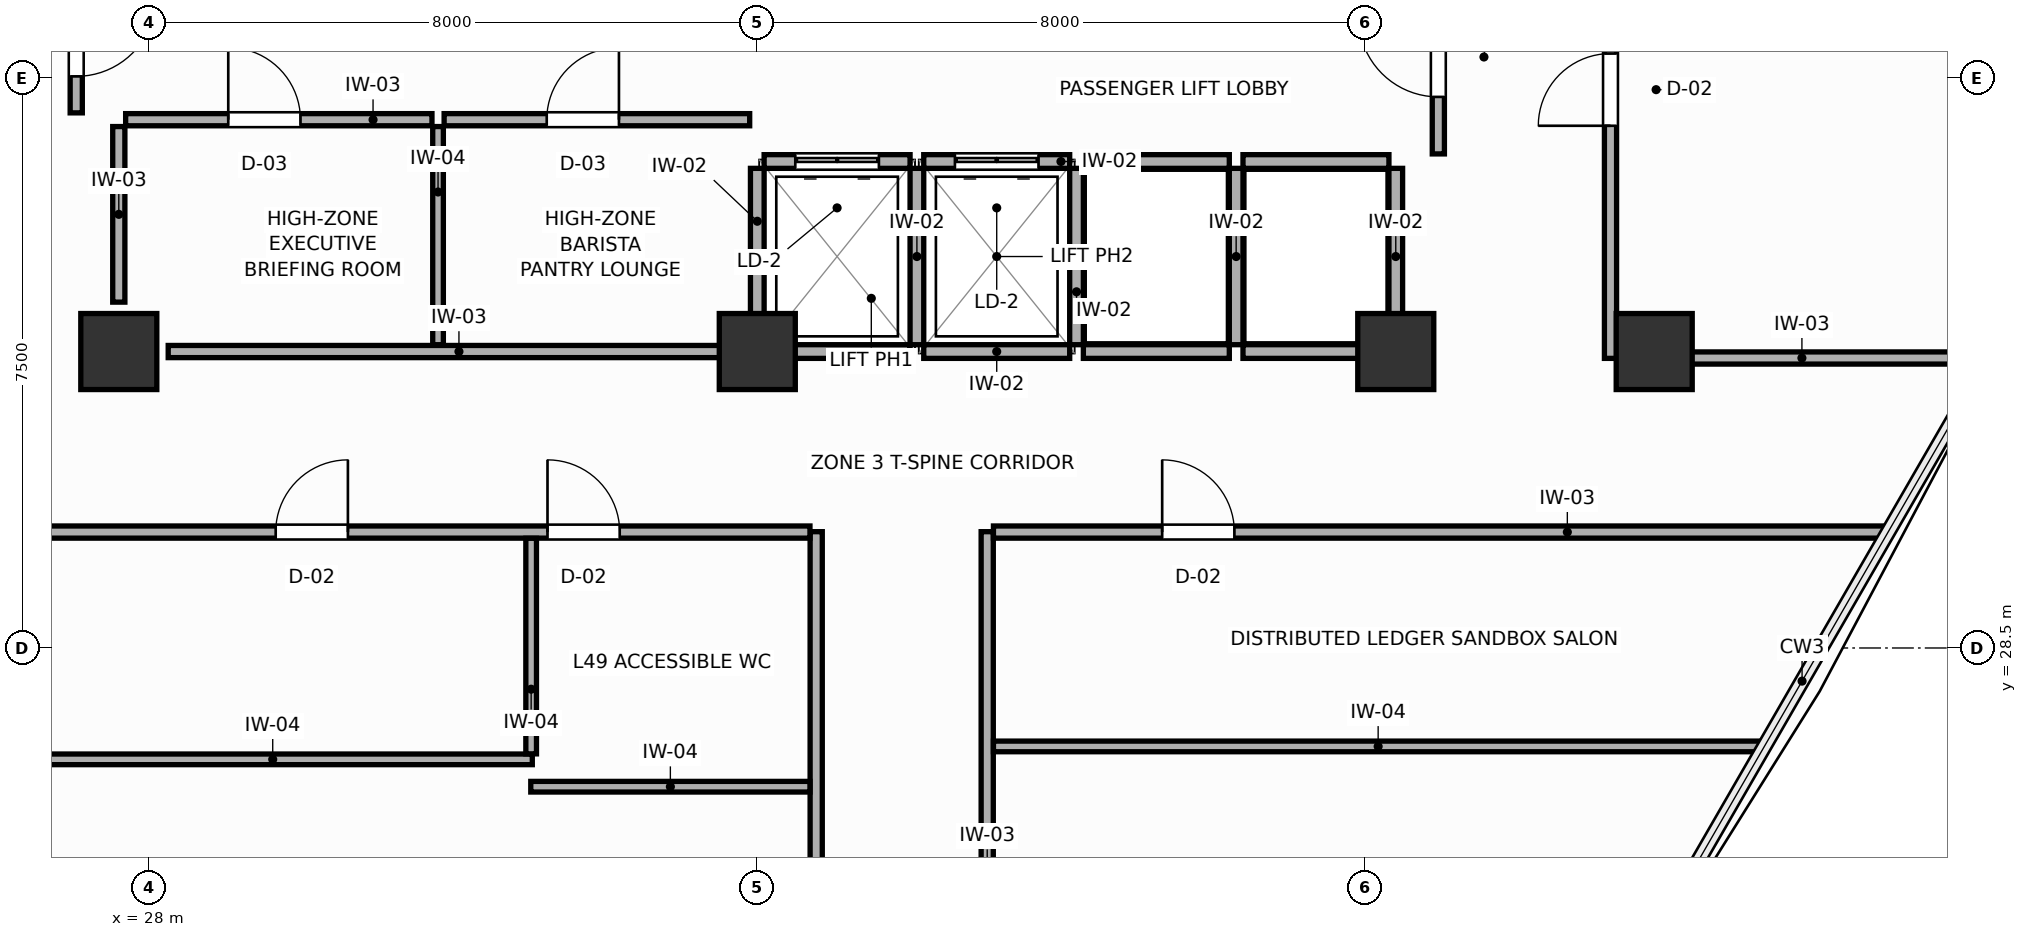
"""IFC4 building model, lengths in metres.
Left out: names, types, materials, properties, quantities, classifications, styles, units other than length and angle.
Written with IfcOpenShell. Run it as: python <this file> out.ifc"""

import sys

from ifc_helpers import new_model, si_unit, direction, frame, frame_2d, origin, origin_2d, place, context, subcontext, project, spatial, rectangle, extrude, source, transform, mapped, element, fill, save


model = new_model("IFC4")
c1 = context("Model", 3, precision=1e-05, world=origin(), true_north=direction((0.0, 1.0)))
c2 = subcontext(c1, "Body", "Model", "MODEL_VIEW")
j1 = project(units=[si_unit("LENGTHUNIT", "METRE"), si_unit("PLANEANGLEUNIT", "RADIAN")], contexts=[c1])
p1 = place(None, origin())
s1 = spatial("IfcSite", under=j1, at=p1, CompositionType="ELEMENT")
p2 = place(p1, origin())
s2 = spatial("IfcBuilding", under=s1, at=p2, CompositionType="ELEMENT")
p3 = place(p2, frame((0.0, 0.0, 190.2)))
s3 = spatial("IfcBuildingStorey", under=s2, at=p3, CompositionType="ELEMENT", Elevation=190.2)
m1 = source(origin(), c2, "Body", "SweptSolid", [
    extrude(rectangle(XDim=1.0, YDim=1.0, at=origin_2d()), origin(), (0.0, 0.0, 1.0), 3.6),
])
for number, where, z_axis, x_axis in (
    (1, (27.6, 32.4, 0.0), (0.0, 0.0, 1.0), (1.0, 0.0, 0.0)),
    (2, (44.4, 32.4, 0.0), (0.0, 0.0, 1.0), (1.0, 0.0, 0.0)),
    (3, (36.0, 32.4, 0.0), (0.0, 0.0, 1.0), (1.0, 0.0, 0.0)),
    (4, (47.8, 32.4, 0.0), (0.0, 0.0, 1.0), (1.0, 0.0, 0.0)),
):
    element("IfcColumn", number, at=place(p3, frame(where, z_axis=z_axis, x_axis=x_axis)), inside=s3, PredefinedType="COLUMN", context=c2, shape_type="MappedRepresentation", body=[
        mapped(m1, transform((0.0, 0.0, 0.0), scale=1.0)),
    ])
p4 = place(p3, frame((36.09, 34.9, 0.0), z_axis=(0.0, 0.0, 1.0), x_axis=(1.0, 0.0, 0.0)))
e5 = element("IfcWall", 5, at=p4, inside=s3, PredefinedType="PARTITIONING", context=c2, shape_type="SweptSolid", body=[
    extrude(rectangle(XDim=1.92, YDim=0.18, at=frame_2d((0.96, 0.0))), origin(), (0.0, 0.0, 1.0), 3.4),
])
p5 = place(p4, frame((0.41, 0.0, 0.0)))
e6 = element("IfcOpeningElement", 6, at=p5, cuts=e5, PredefinedType="OPENING", context=c2, shape_type="SweptSolid", body=[
    extrude(rectangle(XDim=1.1, YDim=2.1, at=frame_2d((0.55, 1.05))), frame((0.0, 0.1, 0.0), z_axis=(0.0, -1.0, 0.0), x_axis=(1.0, 0.0, 0.0)), (0.0, 0.0, 1.0), 0.2),
])
p6 = place(p3, frame((36.09, 32.4, 0.0), z_axis=(0.0, 0.0, 1.0), x_axis=(1.0, 0.0, 0.0)))
e7 = element("IfcWall", 7, at=p6, inside=s3, PredefinedType="PARTITIONING", context=c2, shape_type="SweptSolid", body=[
    extrude(rectangle(XDim=1.92, YDim=0.18, at=frame_2d((0.96, 0.0))), origin(), (0.0, 0.0, 1.0), 2.95),
])
p7 = place(p3, frame((36.0, 32.49, 0.0), z_axis=(0.0, 0.0, 1.0), x_axis=(0.0, 1.0, 0.0)))
e8 = element("IfcWall", 8, at=p7, inside=s3, PredefinedType="PARTITIONING", context=c2, shape_type="SweptSolid", body=[
    extrude(rectangle(XDim=2.32, YDim=0.18, at=frame_2d((1.16, 0.0))), origin(), (0.0, 0.0, 1.0), 3.4),
])
p8 = place(p3, frame((38.19, 34.9, 0.0), z_axis=(0.0, 0.0, 1.0), x_axis=(1.0, 0.0, 0.0)))
e9 = element("IfcWall", 9, at=p8, inside=s3, PredefinedType="PARTITIONING", context=c2, shape_type="SweptSolid", body=[
    extrude(rectangle(XDim=1.92, YDim=0.18, at=frame_2d((0.96, 0.0))), origin(), (0.0, 0.0, 1.0), 3.4),
])
p9 = place(p8, frame((0.41, 0.0, 0.0)))
e10 = element("IfcOpeningElement", 10, at=p9, cuts=e9, PredefinedType="OPENING", context=c2, shape_type="SweptSolid", body=[
    extrude(rectangle(XDim=1.1, YDim=2.1, at=frame_2d((0.55, 1.05))), frame((0.0, 0.1, 0.0), z_axis=(0.0, -1.0, 0.0), x_axis=(1.0, 0.0, 0.0)), (0.0, 0.0, 1.0), 0.2),
])
p10 = place(p3, frame((38.19, 32.4, 0.0), z_axis=(0.0, 0.0, 1.0), x_axis=(1.0, 0.0, 0.0)))
e11 = element("IfcWall", 11, at=p10, inside=s3, PredefinedType="PARTITIONING", context=c2, shape_type="SweptSolid", body=[
    extrude(rectangle(XDim=1.92, YDim=0.18, at=frame_2d((0.96, 0.0))), origin(), (0.0, 0.0, 1.0), 2.95),
])
p11 = place(p3, frame((38.1, 32.49, 0.0), z_axis=(0.0, 0.0, 1.0), x_axis=(0.0, 1.0, 0.0)))
e12 = element("IfcWall", 12, at=p11, inside=s3, PredefinedType="PARTITIONING", context=c2, shape_type="SweptSolid", body=[
    extrude(rectangle(XDim=2.32, YDim=0.18, at=frame_2d((1.16, 0.0))), origin(), (0.0, 0.0, 1.0), 3.4),
])
p12 = place(p3, frame((40.29, 34.9, 0.0), z_axis=(0.0, 0.0, 1.0), x_axis=(1.0, 0.0, 0.0)))
e13 = element("IfcWall", 13, at=p12, inside=s3, PredefinedType="PARTITIONING", context=c2, shape_type="SweptSolid", body=[
    extrude(rectangle(XDim=1.92, YDim=0.18, at=frame_2d((0.96, 0.0))), origin(), (0.0, 0.0, 1.0), 3.4),
])
p13 = place(p3, frame((40.29, 32.4, 0.0), z_axis=(0.0, 0.0, 1.0), x_axis=(1.0, 0.0, 0.0)))
e14 = element("IfcWall", 14, at=p13, inside=s3, PredefinedType="PARTITIONING", context=c2, shape_type="SweptSolid", body=[
    extrude(rectangle(XDim=1.92, YDim=0.18, at=frame_2d((0.96, 0.0))), origin(), (0.0, 0.0, 1.0), 2.95),
])
p14 = place(p3, frame((40.2, 32.49, 0.0), z_axis=(0.0, 0.0, 1.0), x_axis=(0.0, 1.0, 0.0)))
e15 = element("IfcWall", 15, at=p14, inside=s3, PredefinedType="PARTITIONING", context=c2, shape_type="SweptSolid", body=[
    extrude(rectangle(XDim=2.32, YDim=0.18, at=frame_2d((1.16, 0.0))), origin(), (0.0, 0.0, 1.0), 3.4),
])
p15 = place(p3, frame((42.39, 34.9, 0.0), z_axis=(0.0, 0.0, 1.0), x_axis=(1.0, 0.0, 0.0)))
e16 = element("IfcWall", 16, at=p15, inside=s3, PredefinedType="PARTITIONING", context=c2, shape_type="SweptSolid", body=[
    extrude(rectangle(XDim=1.92, YDim=0.18, at=frame_2d((0.96, 0.0))), origin(), (0.0, 0.0, 1.0), 3.4),
])
p16 = place(p3, frame((42.39, 32.4, 0.0), z_axis=(0.0, 0.0, 1.0), x_axis=(1.0, 0.0, 0.0)))
e17 = element("IfcWall", 17, at=p16, inside=s3, PredefinedType="PARTITIONING", context=c2, shape_type="SweptSolid", body=[
    extrude(rectangle(XDim=1.92, YDim=0.18, at=frame_2d((0.96, 0.0))), origin(), (0.0, 0.0, 1.0), 2.95),
])
for number, where, z_axis, x_axis in (
    (18, (42.3, 32.49, 0.0), (0.0, 0.0, 1.0), (0.0, 1.0, 0.0)),
    (19, (44.4, 32.49, 0.0), (0.0, 0.0, 1.0), (0.0, 1.0, 0.0)),
):
    element("IfcWall", number, at=place(p3, frame(where, z_axis=z_axis, x_axis=x_axis)), inside=s3, PredefinedType="PARTITIONING", context=c2, shape_type="SweptSolid", body=[
        extrude(rectangle(XDim=2.32, YDim=0.18, at=frame_2d((1.16, 0.0))), origin(), (0.0, 0.0, 1.0), 3.4),
    ])
p17 = place(p3, frame((28.25, 32.4, 0.0), z_axis=(0.0, 0.0, 1.0), x_axis=(1.0, 0.0, 0.0)))
e20 = element("IfcWall", 20, at=p17, inside=s3, PredefinedType="PARTITIONING", context=c2, shape_type="SweptSolid", body=[
    extrude(rectangle(XDim=7.65, YDim=0.16, at=frame_2d((3.825, 0.0))), origin(), (0.0, 0.0, 1.0), 2.95),
])
p18 = place(p3, frame((27.6, 33.05, 0.0), z_axis=(0.0, 0.0, 1.0), x_axis=(0.0, 1.0, 0.0)))
e21 = element("IfcWall", 21, at=p18, inside=s3, PredefinedType="PARTITIONING", context=c2, shape_type="SweptSolid", body=[
    extrude(rectangle(XDim=2.31, YDim=0.16, at=frame_2d((1.155, 0.0))), origin(), (0.0, 0.0, 1.0), 3.4),
])
p19 = place(p3, frame((31.8, 32.49, 0.0), z_axis=(0.0, 0.0, 1.0), x_axis=(0.0, 1.0, 0.0)))
e22 = element("IfcWall", 22, at=p19, inside=s3, PredefinedType="PARTITIONING", context=c2, shape_type="SweptSolid", body=[
    extrude(rectangle(XDim=2.87, YDim=0.14, at=frame_2d((1.435, 0.0))), origin(), (0.0, 0.0, 1.0), 3.4),
])
p20 = place(p3, frame((27.69, 35.45, 0.0), z_axis=(0.0, 0.0, 1.0), x_axis=(1.0, 0.0, 0.0)))
e23 = element("IfcWall", 23, at=p20, inside=s3, PredefinedType="PARTITIONING", context=c2, shape_type="SweptSolid", body=[
    extrude(rectangle(XDim=4.03, YDim=0.16, at=frame_2d((2.015, 0.0))), origin(), (0.0, 0.0, 1.0), 3.4),
])
p21 = place(p20, frame((1.35, 0.0, 0.0)))
e24 = element("IfcOpeningElement", 24, at=p21, cuts=e23, PredefinedType="OPENING", context=c2, shape_type="SweptSolid", body=[
    extrude(rectangle(XDim=0.95, YDim=2.05, at=frame_2d((0.475, 1.025))), frame((0.0, 0.09, 0.0), z_axis=(0.0, -1.0, 0.0), x_axis=(1.0, 0.0, 0.0)), (0.0, 0.0, 1.0), 0.18),
])
p22 = place(p3, frame((31.88, 35.45, 0.0), z_axis=(0.0, 0.0, 1.0), x_axis=(1.0, 0.0, 0.0)))
e25 = element("IfcWall", 25, at=p22, inside=s3, PredefinedType="PARTITIONING", context=c2, shape_type="SweptSolid", body=[
    extrude(rectangle(XDim=4.02, YDim=0.16, at=frame_2d((2.01, 0.0))), origin(), (0.0, 0.0, 1.0), 3.4),
])
p23 = place(p22, frame((1.35, 0.0, 0.0)))
e26 = element("IfcOpeningElement", 26, at=p23, cuts=e25, PredefinedType="OPENING", context=c2, shape_type="SweptSolid", body=[
    extrude(rectangle(XDim=0.95, YDim=2.05, at=frame_2d((0.475, 1.025))), frame((0.0, 0.09, 0.0), z_axis=(0.0, -1.0, 0.0), x_axis=(1.0, 0.0, 0.0)), (0.0, 0.0, 1.0), 0.18),
])
p24 = place(p3, frame((27.04, 35.54, 0.0), z_axis=(0.0, 0.0, 1.0), x_axis=(0.0, 1.0, 0.0)))
e27 = element("IfcWall", 27, at=p24, inside=s3, PredefinedType="PARTITIONING", context=c2, shape_type="SweptSolid", body=[
    extrude(rectangle(XDim=2.11, YDim=0.16, at=frame_2d((1.055, 0.0))), origin(), (0.0, 0.0, 1.0), 3.4),
])
p25 = place(p24, frame((0.48, 0.0, 0.0)))
e28 = element("IfcOpeningElement", 28, at=p25, cuts=e27, PredefinedType="OPENING", context=c2, shape_type="SweptSolid", body=[
    extrude(rectangle(XDim=1.05, YDim=2.1, at=frame_2d((0.525, 1.05))), frame((0.0, 0.09, 0.0), z_axis=(0.0, -1.0, 0.0), x_axis=(1.0, 0.0, 0.0)), (0.0, 0.0, 1.0), 0.18),
])
p26 = place(p3, frame((44.96, 35.0, 0.0), z_axis=(0.0, 0.0, 1.0), x_axis=(0.0, 1.0, 0.0)))
e29 = element("IfcWall", 29, at=p26, inside=s3, PredefinedType="PARTITIONING", context=c2, shape_type="SweptSolid", body=[
    extrude(rectangle(XDim=2.65, YDim=0.16, at=frame_2d((1.325, 0.0))), origin(), (0.0, 0.0, 1.0), 3.4),
])
p27 = place(p26, frame((0.75, 0.0, 0.0)))
e30 = element("IfcOpeningElement", 30, at=p27, cuts=e29, PredefinedType="OPENING", context=c2, shape_type="SweptSolid", body=[
    extrude(rectangle(XDim=1.05, YDim=2.1, at=frame_2d((0.525, 1.05))), frame((0.0, 0.09, 0.0), z_axis=(0.0, -1.0, 0.0), x_axis=(1.0, 0.0, 0.0)), (0.0, 0.0, 1.0), 0.18),
])
p28 = place(p3, frame((47.225, 32.31, 0.0), z_axis=(0.0, 0.0, 1.0), x_axis=(0.0, 1.0, 0.0)))
e31 = element("IfcWall", 31, at=p28, inside=s3, PredefinedType="PARTITIONING", context=c2, shape_type="SweptSolid", body=[
    extrude(rectangle(XDim=18.753, YDim=0.16, at=frame_2d((9.376, 0.0))), origin(), (0.0, 0.0, 1.0), 3.4),
])
p29 = place(p28, frame((3.06, 0.0, 0.0)))
e32 = element("IfcOpeningElement", 32, at=p29, cuts=e31, PredefinedType="OPENING", context=c2, shape_type="SweptSolid", body=[
    extrude(rectangle(XDim=0.95, YDim=2.05, at=frame_2d((0.475, 1.025))), frame((0.0, 0.09, 0.0), z_axis=(0.0, -1.0, 0.0), x_axis=(1.0, 0.0, 0.0)), (0.0, 0.0, 1.0), 0.18),
])
p30 = place(p28, frame((11.593, 0.0, 0.0)))
e33 = element("IfcOpeningElement", 33, at=p30, cuts=e31, PredefinedType="OPENING", context=c2, shape_type="SweptSolid", body=[
    extrude(rectangle(XDim=0.95, YDim=2.05, at=frame_2d((0.475, 1.025))), frame((0.0, 0.09, 0.0), z_axis=(0.0, -1.0, 0.0), x_axis=(1.0, 0.0, 0.0)), (0.0, 0.0, 1.0), 0.18),
])
p31 = place(p3, frame((36.775, 11.485, 0.0), z_axis=(0.0, 0.0, 1.0), x_axis=(0.0, 1.0, 0.0)))
e34 = element("IfcWall", 34, at=p31, inside=s3, PredefinedType="PARTITIONING", context=c2, shape_type="SweptSolid", body=[
    extrude(rectangle(XDim=18.545, YDim=0.16, at=frame_2d((9.272, 0.0))), origin(), (0.0, 0.0, 1.0), 2.95),
])
p32 = place(p31, frame((5.249, 0.0, 0.0)))
e35 = element("IfcOpeningElement", 35, at=p32, cuts=e34, PredefinedType="OPENING", context=c2, shape_type="SweptSolid", body=[
    extrude(rectangle(XDim=0.95, YDim=2.05, at=frame_2d((0.475, 1.025))), frame((0.0, 0.09, 0.0), z_axis=(0.0, -1.0, 0.0), x_axis=(1.0, 0.0, 0.0)), (0.0, 0.0, 1.0), 0.18),
])
p33 = place(p3, frame((39.025, 13.29, 0.0), z_axis=(0.0, 0.0, 1.0), x_axis=(0.0, 1.0, 0.0)))
e36 = element("IfcWall", 36, at=p33, inside=s3, PredefinedType="PARTITIONING", context=c2, shape_type="SweptSolid", body=[
    extrude(rectangle(XDim=16.74, YDim=0.16, at=frame_2d((8.37, 0.0))), origin(), (0.0, 0.0, 1.0), 3.4),
])
p34 = place(p33, frame((6.716, 0.0, 0.0)))
e37 = element("IfcOpeningElement", 37, at=p34, cuts=e36, PredefinedType="OPENING", context=c2, shape_type="SweptSolid", body=[
    extrude(rectangle(XDim=0.95, YDim=2.05, at=frame_2d((0.475, 1.025))), frame((0.0, 0.09, 0.0), z_axis=(0.0, -1.0, 0.0), x_axis=(1.0, 0.0, 0.0)), (0.0, 0.0, 1.0), 0.18),
])
p35 = place(p3, frame((21.143, 30.025, 0.0), z_axis=(0.0, 0.0, 1.0), x_axis=(1.0, 0.0, 0.0)))
e38 = element("IfcWall", 38, at=p35, inside=s3, PredefinedType="PARTITIONING", context=c2, shape_type="SweptSolid", body=[
    extrude(rectangle(XDim=15.551, YDim=0.16, at=frame_2d((7.775, 0.0))), origin(), (0.0, 0.0, 1.0), 3.4),
])
p36 = place(p35, frame((12.097, 0.0, 0.0)))
e39 = element("IfcOpeningElement", 39, at=p36, cuts=e38, PredefinedType="OPENING", context=c2, shape_type="SweptSolid", body=[
    extrude(rectangle(XDim=0.95, YDim=2.05, at=frame_2d((0.475, 1.025))), frame((0.0, 0.09, 0.0), z_axis=(0.0, -1.0, 0.0), x_axis=(1.0, 0.0, 0.0)), (0.0, 0.0, 1.0), 0.18),
])
p37 = place(p35, frame((8.521, 0.0, 0.0)))
e40 = element("IfcOpeningElement", 40, at=p37, cuts=e38, PredefinedType="OPENING", context=c2, shape_type="SweptSolid", body=[
    extrude(rectangle(XDim=0.95, YDim=2.05, at=frame_2d((0.475, 1.025))), frame((0.0, 0.09, 0.0), z_axis=(0.0, -1.0, 0.0), x_axis=(1.0, 0.0, 0.0)), (0.0, 0.0, 1.0), 0.18),
])
p38 = place(p3, frame((39.107, 30.025, 0.0), z_axis=(0.0, 0.0, 1.0), x_axis=(1.0, 0.0, 0.0)))
e41 = element("IfcWall", 41, at=p38, inside=s3, PredefinedType="PARTITIONING", context=c2, shape_type="SweptSolid", body=[
    extrude(rectangle(XDim=11.75, YDim=0.16, at=frame_2d((5.875, 0.0))), origin(), (0.0, 0.0, 1.0), 3.4),
])
p39 = place(p38, frame((2.22, 0.0, 0.0)))
e42 = element("IfcOpeningElement", 42, at=p39, cuts=e41, PredefinedType="OPENING", context=c2, shape_type="SweptSolid", body=[
    extrude(rectangle(XDim=0.95, YDim=2.05, at=frame_2d((0.475, 1.025))), frame((0.0, 0.09, 0.0), z_axis=(0.0, -1.0, 0.0), x_axis=(1.0, 0.0, 0.0)), (0.0, 0.0, 1.0), 0.18),
])
p40 = place(p3, frame((47.307, 32.315, 0.0), z_axis=(0.0, 0.0, 1.0), x_axis=(1.0, 0.0, 0.0)))
e43 = element("IfcWall", 43, at=p40, inside=s3, PredefinedType="PARTITIONING", context=c2, shape_type="SweptSolid", body=[
    extrude(rectangle(XDim=4.873, YDim=0.16, at=frame_2d((2.437, 0.0))), origin(), (0.0, 0.0, 1.0), 2.95),
])
p41 = place(p3, frame((39.107, 27.205, 0.0), z_axis=(0.0, 0.0, 1.0), x_axis=(1.0, 0.0, 0.0)))
e44 = element("IfcWall", 44, at=p41, inside=s3, PredefinedType="PARTITIONING", context=c2, shape_type="SweptSolid", body=[
    extrude(rectangle(XDim=10.122, YDim=0.14, at=frame_2d((5.061, 0.0))), origin(), (0.0, 0.0, 1.0), 3.4),
])
p42 = place(p3, frame((26.21, 27.035, 0.0), z_axis=(0.0, 0.0, 1.0), x_axis=(1.0, 0.0, 0.0)))
e45 = element("IfcWall", 45, at=p42, inside=s3, PredefinedType="PARTITIONING", context=c2, shape_type="SweptSolid", body=[
    extrude(rectangle(XDim=6.83, YDim=0.14, at=frame_2d((3.415, 0.0))), origin(), (0.0, 0.0, 1.0), 3.4),
])
p43 = place(p3, frame((33.02, 26.675, 0.0), z_axis=(0.0, 0.0, 1.0), x_axis=(1.0, 0.0, 0.0)))
e46 = element("IfcWall", 46, at=p43, inside=s3, PredefinedType="PARTITIONING", context=c2, shape_type="SweptSolid", body=[
    extrude(rectangle(XDim=3.673, YDim=0.14, at=frame_2d((1.836, 0.0))), origin(), (0.0, 0.0, 1.0), 3.4),
])
p44 = place(p3, frame((33.025, 27.107, 0.0), z_axis=(0.0, 0.0, 1.0), x_axis=(0.0, 1.0, 0.0)))
e47 = element("IfcWall", 47, at=p44, inside=s3, PredefinedType="PARTITIONING", context=c2, shape_type="SweptSolid", body=[
    extrude(rectangle(XDim=2.836, YDim=0.14, at=frame_2d((1.418, 0.0))), origin(), (0.0, 0.0, 1.0), 3.4),
])
p45 = place(p5, origin())
e48 = element("IfcDoor", 48, at=p45, inside=s3, OperationType="DOUBLE_DOOR_SLIDING", PredefinedType="DOOR", context=c2, shape_type="SweptSolid", body=[
    extrude(rectangle(XDim=1.1, YDim=2.1, at=frame_2d((0.55, 1.05))), frame((0.0, 0.025, 0.0), z_axis=(0.0, -1.0, 0.0), x_axis=(1.0, 0.0, 0.0)), (0.0, 0.0, 1.0), 0.05),
])
fill(e6, e48)
p46 = place(p9, origin())
e49 = element("IfcDoor", 49, at=p46, inside=s3, OperationType="DOUBLE_DOOR_SLIDING", PredefinedType="DOOR", context=c2, shape_type="SweptSolid", body=[
    extrude(rectangle(XDim=1.1, YDim=2.1, at=frame_2d((0.55, 1.05))), frame((0.0, 0.025, 0.0), z_axis=(0.0, -1.0, 0.0), x_axis=(1.0, 0.0, 0.0)), (0.0, 0.0, 1.0), 0.05),
])
fill(e10, e49)
p47 = place(p21, origin())
e50 = element("IfcDoor", 50, at=p47, inside=s3, OperationType="SINGLE_SWING_LEFT", PredefinedType="DOOR", context=c2, shape_type="SweptSolid", body=[
    extrude(rectangle(XDim=0.95, YDim=2.05, at=frame_2d((0.475, 1.025))), frame((0.0, 0.025, 0.0), z_axis=(0.0, -1.0, 0.0), x_axis=(1.0, 0.0, 0.0)), (0.0, 0.0, 1.0), 0.05),
])
fill(e24, e50)
p48 = place(p23, origin())
e51 = element("IfcDoor", 51, at=p48, inside=s3, OperationType="SINGLE_SWING_RIGHT", PredefinedType="DOOR", context=c2, shape_type="SweptSolid", body=[
    extrude(rectangle(XDim=0.95, YDim=2.05, at=frame_2d((0.475, 1.025))), frame((0.0, 0.025, 0.0), z_axis=(0.0, -1.0, 0.0), x_axis=(1.0, 0.0, 0.0)), (0.0, 0.0, 1.0), 0.05),
])
fill(e26, e51)
p49 = place(p25, frame((1.05, 0.0, 0.0), z_axis=(0.0, 0.0, 1.0), x_axis=(-1.0, 0.0, 0.0)))
e52 = element("IfcDoor", 52, at=p49, inside=s3, OperationType="SINGLE_SWING_LEFT", PredefinedType="DOOR", context=c2, shape_type="SweptSolid", body=[
    extrude(rectangle(XDim=1.05, YDim=2.1, at=frame_2d((0.525, 1.05))), frame((0.0, 0.025, 0.0), z_axis=(0.0, -1.0, 0.0), x_axis=(1.0, 0.0, 0.0)), (0.0, 0.0, 1.0), 0.05),
])
fill(e28, e52)
p50 = place(p27, origin())
e53 = element("IfcDoor", 53, at=p50, inside=s3, OperationType="SINGLE_SWING_RIGHT", PredefinedType="DOOR", context=c2, shape_type="SweptSolid", body=[
    extrude(rectangle(XDim=1.05, YDim=2.1, at=frame_2d((0.525, 1.05))), frame((0.0, 0.025, 0.0), z_axis=(0.0, -1.0, 0.0), x_axis=(1.0, 0.0, 0.0)), (0.0, 0.0, 1.0), 0.05),
])
fill(e30, e53)
p51 = place(p29, origin())
e54 = element("IfcDoor", 54, at=p51, inside=s3, OperationType="SINGLE_SWING_LEFT", PredefinedType="DOOR", context=c2, shape_type="SweptSolid", body=[
    extrude(rectangle(XDim=0.95, YDim=2.05, at=frame_2d((0.475, 1.025))), frame((0.0, 0.025, 0.0), z_axis=(0.0, -1.0, 0.0), x_axis=(1.0, 0.0, 0.0)), (0.0, 0.0, 1.0), 0.05),
])
fill(e32, e54)
p52 = place(p36, origin())
e55 = element("IfcDoor", 55, at=p52, inside=s3, OperationType="SINGLE_SWING_LEFT", PredefinedType="DOOR", context=c2, shape_type="SweptSolid", body=[
    extrude(rectangle(XDim=0.95, YDim=2.05, at=frame_2d((0.475, 1.025))), frame((0.0, 0.025, 0.0), z_axis=(0.0, -1.0, 0.0), x_axis=(1.0, 0.0, 0.0)), (0.0, 0.0, 1.0), 0.05),
])
fill(e39, e55)
p53 = place(p37, origin())
e56 = element("IfcDoor", 56, at=p53, inside=s3, OperationType="SINGLE_SWING_RIGHT", PredefinedType="DOOR", context=c2, shape_type="SweptSolid", body=[
    extrude(rectangle(XDim=0.95, YDim=2.05, at=frame_2d((0.475, 1.025))), frame((0.0, 0.025, 0.0), z_axis=(0.0, -1.0, 0.0), x_axis=(1.0, 0.0, 0.0)), (0.0, 0.0, 1.0), 0.05),
])
fill(e40, e56)
p54 = place(p39, origin())
e57 = element("IfcDoor", 57, at=p54, inside=s3, OperationType="SINGLE_SWING_LEFT", PredefinedType="DOOR", context=c2, shape_type="SweptSolid", body=[
    extrude(rectangle(XDim=0.95, YDim=2.05, at=frame_2d((0.475, 1.025))), frame((0.0, 0.025, 0.0), z_axis=(0.0, -1.0, 0.0), x_axis=(1.0, 0.0, 0.0)), (0.0, 0.0, 1.0), 0.05),
])
fill(e42, e57)
save(model, sys.argv[1])
